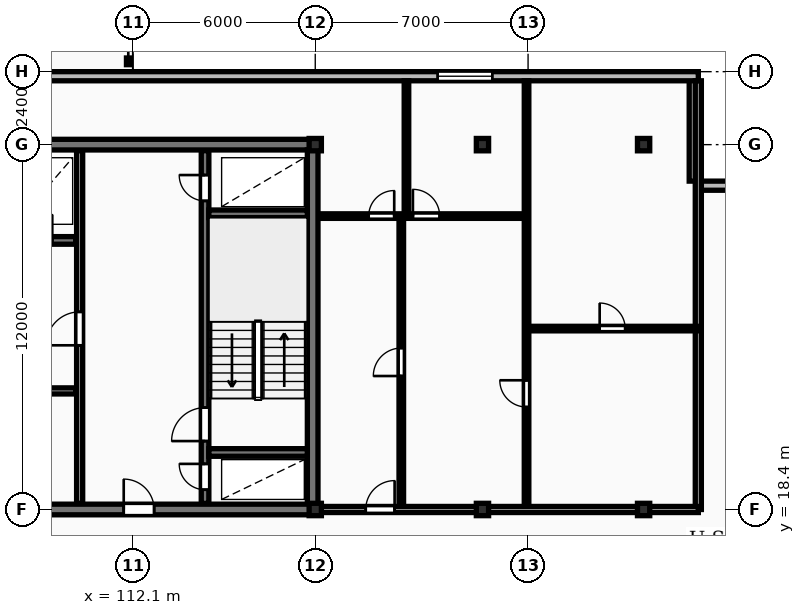
"""IFC4 building model, lengths in metres.
Left out: names, types, materials, properties, quantities, classifications, styles, units other than length and angle.
Written with IfcOpenShell. Run it as: python <this file> out.ifc"""

import sys

from ifc_helpers import new_model, si_unit, direction, frame, frame_2d, origin, origin_2d, place, context, subcontext, project, spatial, rectangle, i_section, extrude, element, fill, save


model = new_model("IFC4")
c1 = context("Model", 3, precision=1e-05, world=origin(), true_north=direction((0.0, 1.0)))
c2 = subcontext(c1, "Body", "Model", "MODEL_VIEW")
j1 = project(units=[si_unit("LENGTHUNIT", "METRE"), si_unit("PLANEANGLEUNIT", "RADIAN")], contexts=[c1])
p1 = place(None, origin())
s1 = spatial("IfcSite", under=j1, at=p1, CompositionType="ELEMENT")
p2 = place(p1, origin())
s2 = spatial("IfcBuilding", under=s1, at=p2, CompositionType="ELEMENT")
p3 = place(p2, frame((0.0, 0.0, 142.9)))
s3 = spatial("IfcBuildingStorey", under=s2, at=p3, CompositionType="ELEMENT", Elevation=142.9)
for number, where, z_axis, x_axis in (
    (1, (118.1, 18.4, 0.0), (0.0, 0.0, 1.0), (1.0, 0.0, 0.0)),
    (2, (118.1, 30.4, 0.0), (0.0, 0.0, 1.0), (1.0, 0.0, 0.0)),
    (3, (123.6, 18.4, 0.0), (0.0, 0.0, 1.0), (1.0, 0.0, 0.0)),
    (4, (123.6, 30.4, 0.0), (0.0, 0.0, 1.0), (1.0, 0.0, 0.0)),
    (5, (128.9, 18.4, 0.0), (0.0, 0.0, 1.0), (1.0, 0.0, 0.0)),
    (6, (128.9, 30.4, 0.0), (0.0, 0.0, 1.0), (1.0, 0.0, 0.0)),
):
    element("IfcColumn", number, at=place(p3, frame(where, z_axis=z_axis, x_axis=x_axis)), inside=s3, PredefinedType="COLUMN", context=c2, shape_type="SweptSolid", body=[
        extrude(i_section(OverallWidth=0.403, OverallDepth=0.406, WebThickness=0.027, FlangeThickness=0.043, FilletRadius=0.015, at=origin_2d()), origin(), (0.0, 0.0, 1.0), 3.6),
    ])
for number, where, z_axis, x_axis in (
    (7, (134.3, 29.05, 0.0), (0.0, 0.0, 1.0), (-1.0, 0.0, 0.0)),
    (8, (130.55, 29.2, 0.0), (0.0, 0.0, 1.0), (0.0, 1.0, 0.0)),
):
    element("IfcWall", number, at=place(p3, frame(where, z_axis=z_axis, x_axis=x_axis)), inside=s3, PredefinedType="STANDARD", context=c2, shape_type="SweptSolid", body=[
        extrude(rectangle(XDim=3.6, YDim=0.3, at=frame_2d((1.8, 0.0))), origin(), (0.0, 0.0, 1.0), 3.31),
    ])
p4 = place(p3, frame((130.7, 32.65, 0.0), z_axis=(0.0, 0.0, 1.0), x_axis=(-1.0, 0.0, 0.0)))
e9 = element("IfcWall", 9, at=p4, inside=s3, PredefinedType="STANDARD", context=c2, shape_type="SweptSolid", body=[
    extrude(rectangle(XDim=58.0, YDim=0.3, at=frame_2d((29.0, 0.0))), origin(), (0.0, 0.0, 1.0), 3.31),
])
p5 = place(p4, frame((50.125, 0.0, 0.85)))
e10 = element("IfcOpeningElement", 10, at=p5, cuts=e9, PredefinedType="OPENING", context=c2, shape_type="SweptSolid", body=[
    extrude(rectangle(XDim=1.8, YDim=1.8, at=frame_2d((0.9, 0.9))), frame((0.0, 0.16, 0.0), z_axis=(0.0, -1.0, 0.0), x_axis=(1.0, 0.0, 0.0)), (0.0, 0.0, 1.0), 0.32),
])
p6 = place(p4, frame((6.775, 0.0, 0.85)))
e11 = element("IfcOpeningElement", 11, at=p6, cuts=e9, PredefinedType="OPENING", context=c2, shape_type="SweptSolid", body=[
    extrude(rectangle(XDim=1.8, YDim=1.8, at=frame_2d((0.9, 0.9))), frame((0.0, 0.16, 0.0), z_axis=(0.0, -1.0, 0.0), x_axis=(1.0, 0.0, 0.0)), (0.0, 0.0, 1.0), 0.32),
])
p7 = place(p4, frame((38.0, 0.0, 0.0)))
e12 = element("IfcOpeningElement", 12, at=p7, cuts=e9, PredefinedType="OPENING", context=c2, shape_type="SweptSolid", body=[
    extrude(rectangle(XDim=1.1, YDim=2.1, at=frame_2d((0.55, 1.05))), frame((0.0, 0.16, 0.0), z_axis=(0.0, -1.0, 0.0), x_axis=(1.0, 0.0, 0.0)), (0.0, 0.0, 1.0), 0.32),
])
p8 = place(p3, frame((81.925, 30.4, 0.0), z_axis=(0.0, 0.0, 1.0), x_axis=(1.0, 0.0, 0.0)))
e13 = element("IfcWall", 13, at=p8, inside=s3, PredefinedType="SHEAR", context=c2, shape_type="SweptSolid", body=[
    extrude(rectangle(XDim=36.265, YDim=0.35, at=frame_2d((18.132, 0.0))), origin(), (0.0, 0.0, 1.0), 3.6),
])
p9 = place(p8, frame((9.675, 0.0, 0.0)))
e14 = element("IfcOpeningElement", 14, at=p9, cuts=e13, PredefinedType="OPENING", context=c2, shape_type="SweptSolid", body=[
    extrude(rectangle(XDim=1.1, YDim=2.1, at=frame_2d((0.55, 1.05))), frame((0.0, 0.185, 0.0), z_axis=(0.0, -1.0, 0.0), x_axis=(1.0, 0.0, 0.0)), (0.0, 0.0, 1.0), 0.37),
])
p10 = place(p3, frame((118.015, 18.575, 0.0), z_axis=(0.0, 0.0, 1.0), x_axis=(0.0, 1.0, 0.0)))
e15 = element("IfcWall", 15, at=p10, inside=s3, PredefinedType="SHEAR", context=c2, shape_type="SweptSolid", body=[
    extrude(rectangle(XDim=11.65, YDim=0.35, at=frame_2d((5.825, 0.0))), origin(), (0.0, 0.0, 1.0), 3.6),
])
p11 = place(p3, frame((81.925, 18.4, 0.0), z_axis=(0.0, 0.0, 1.0), x_axis=(1.0, 0.0, 0.0)))
e16 = element("IfcWall", 16, at=p11, inside=s3, PredefinedType="SHEAR", context=c2, shape_type="SweptSolid", body=[
    extrude(rectangle(XDim=36.265, YDim=0.35, at=frame_2d((18.132, 0.0))), origin(), (0.0, 0.0, 1.0), 3.6),
])
p12 = place(p11, frame((5.675, 0.0, 0.0)))
e17 = element("IfcOpeningElement", 17, at=p12, cuts=e16, PredefinedType="OPENING", context=c2, shape_type="SweptSolid", body=[
    extrude(rectangle(XDim=1.0, YDim=2.15, at=frame_2d((0.5, 1.075))), frame((0.0, 0.185, 0.0), z_axis=(0.0, -1.0, 0.0), x_axis=(1.0, 0.0, 0.0)), (0.0, 0.0, 1.0), 0.37),
])
p13 = place(p11, frame((21.925, 0.0, 0.0)))
e18 = element("IfcOpeningElement", 18, at=p13, cuts=e16, PredefinedType="OPENING", context=c2, shape_type="SweptSolid", body=[
    extrude(rectangle(XDim=1.5, YDim=2.2, at=frame_2d((0.75, 1.1))), frame((0.0, 0.185, 0.0), z_axis=(0.0, -1.0, 0.0), x_axis=(1.0, 0.0, 0.0)), (0.0, 0.0, 1.0), 0.37),
])
p14 = place(p11, frame((29.875, 0.0, 0.0)))
e19 = element("IfcOpeningElement", 19, at=p14, cuts=e16, PredefinedType="OPENING", context=c2, shape_type="SweptSolid", body=[
    extrude(rectangle(XDim=1.0, YDim=2.15, at=frame_2d((0.5, 1.075))), frame((0.0, 0.185, 0.0), z_axis=(0.0, -1.0, 0.0), x_axis=(1.0, 0.0, 0.0)), (0.0, 0.0, 1.0), 0.37),
])
p15 = place(p3, frame((99.68, 27.25, 0.0), z_axis=(0.0, 0.0, 1.0), x_axis=(1.0, 0.0, 0.0)))
e20 = element("IfcWall", 20, at=p15, inside=s3, PredefinedType="SHEAR", context=c2, shape_type="SweptSolid", body=[
    extrude(rectangle(XDim=10.54, YDim=0.25, at=frame_2d((5.27, 0.0))), origin(), (0.0, 0.0, 1.0), 3.6),
])
p16 = place(p15, frame((0.76, 0.0, 0.0)))
e21 = element("IfcOpeningElement", 21, at=p16, cuts=e20, PredefinedType="OPENING", context=c2, shape_type="SweptSolid", body=[
    extrude(rectangle(XDim=1.12, YDim=2.12, at=frame_2d((0.56, 1.06))), frame((0.0, 0.135, 0.0), z_axis=(0.0, -1.0, 0.0), x_axis=(1.0, 0.0, 0.0)), (0.0, 0.0, 1.0), 0.27),
])
p17 = place(p15, frame((3.56, 0.0, 0.0)))
e22 = element("IfcOpeningElement", 22, at=p17, cuts=e20, PredefinedType="OPENING", context=c2, shape_type="SweptSolid", body=[
    extrude(rectangle(XDim=1.12, YDim=2.12, at=frame_2d((0.56, 1.06))), frame((0.0, 0.135, 0.0), z_axis=(0.0, -1.0, 0.0), x_axis=(1.0, 0.0, 0.0)), (0.0, 0.0, 1.0), 0.27),
])
p18 = place(p15, frame((6.36, 0.0, 0.0)))
e23 = element("IfcOpeningElement", 23, at=p18, cuts=e20, PredefinedType="OPENING", context=c2, shape_type="SweptSolid", body=[
    extrude(rectangle(XDim=1.12, YDim=2.12, at=frame_2d((0.56, 1.06))), frame((0.0, 0.135, 0.0), z_axis=(0.0, -1.0, 0.0), x_axis=(1.0, 0.0, 0.0)), (0.0, 0.0, 1.0), 0.27),
])
p19 = place(p15, frame((8.92, 0.0, 0.0)))
e24 = element("IfcOpeningElement", 24, at=p19, cuts=e20, PredefinedType="OPENING", context=c2, shape_type="SweptSolid", body=[
    extrude(rectangle(XDim=0.85, YDim=2.05, at=frame_2d((0.425, 1.025))), frame((0.0, 0.135, 0.0), z_axis=(0.0, -1.0, 0.0), x_axis=(1.0, 0.0, 0.0)), (0.0, 0.0, 1.0), 0.27),
])
p20 = place(p3, frame((91.08, 22.3, 0.0), z_axis=(0.0, 0.0, 1.0), x_axis=(1.0, 0.0, 0.0)))
e25 = element("IfcWall", 25, at=p20, inside=s3, PredefinedType="PARTITIONING", context=c2, shape_type="SweptSolid", body=[
    extrude(rectangle(XDim=19.14, YDim=0.2, at=frame_2d((9.57, 0.0))), origin(), (0.0, 0.0, 1.0), 3.31),
])
p21 = place(p20, frame((1.15, 0.0, 0.0)))
e26 = element("IfcOpeningElement", 26, at=p21, cuts=e25, PredefinedType="OPENING", context=c2, shape_type="SweptSolid", body=[
    extrude(rectangle(XDim=0.85, YDim=2.05, at=frame_2d((0.425, 1.025))), frame((0.0, 0.11, 0.0), z_axis=(0.0, -1.0, 0.0), x_axis=(1.0, 0.0, 0.0)), (0.0, 0.0, 1.0), 0.22),
])
p22 = place(p20, frame((3.2, 0.0, 0.0)))
e27 = element("IfcOpeningElement", 27, at=p22, cuts=e25, PredefinedType="OPENING", context=c2, shape_type="SweptSolid", body=[
    extrude(rectangle(XDim=0.85, YDim=2.05, at=frame_2d((0.425, 1.025))), frame((0.0, 0.11, 0.0), z_axis=(0.0, -1.0, 0.0), x_axis=(1.0, 0.0, 0.0)), (0.0, 0.0, 1.0), 0.22),
])
p23 = place(p20, frame((12.72, 0.0, 0.0)))
e28 = element("IfcOpeningElement", 28, at=p23, cuts=e25, PredefinedType="OPENING", context=c2, shape_type="SweptSolid", body=[
    extrude(rectangle(XDim=1.5, YDim=2.2, at=frame_2d((0.75, 1.1))), frame((0.0, 0.11, 0.0), z_axis=(0.0, -1.0, 0.0), x_axis=(1.0, 0.0, 0.0)), (0.0, 0.0, 1.0), 0.22),
])
p24 = place(p20, frame((6.42, 0.0, 0.0)))
e29 = element("IfcOpeningElement", 29, at=p24, cuts=e25, PredefinedType="OPENING", context=c2, shape_type="SweptSolid", body=[
    extrude(rectangle(XDim=0.92, YDim=2.08, at=frame_2d((0.46, 1.04))), frame((0.0, 0.11, 0.0), z_axis=(0.0, -1.0, 0.0), x_axis=(1.0, 0.0, 0.0)), (0.0, 0.0, 1.0), 0.22),
])
p25 = place(p20, frame((15.87, 0.0, 0.0)))
e30 = element("IfcOpeningElement", 30, at=p25, cuts=e25, PredefinedType="OPENING", context=c2, shape_type="SweptSolid", body=[
    extrude(rectangle(XDim=0.92, YDim=2.08, at=frame_2d((0.46, 1.04))), frame((0.0, 0.11, 0.0), z_axis=(0.0, -1.0, 0.0), x_axis=(1.0, 0.0, 0.0)), (0.0, 0.0, 1.0), 0.22),
])
p26 = place(p3, frame((110.35, 18.6, 0.0), z_axis=(0.0, 0.0, 1.0), x_axis=(0.0, 1.0, 0.0)))
e31 = element("IfcWall", 31, at=p26, inside=s3, PredefinedType="PARTITIONING", context=c2, shape_type="SweptSolid", body=[
    extrude(rectangle(XDim=11.6, YDim=0.2, at=frame_2d((5.8, 0.0))), origin(), (0.0, 0.0, 1.0), 3.31),
])
p27 = place(p26, frame((5.2, 0.0, 0.0)))
e32 = element("IfcOpeningElement", 32, at=p27, cuts=e31, PredefinedType="OPENING", context=c2, shape_type="SweptSolid", body=[
    extrude(rectangle(XDim=1.1, YDim=2.15, at=frame_2d((0.55, 1.075))), frame((0.0, 0.11, 0.0), z_axis=(0.0, -1.0, 0.0), x_axis=(1.0, 0.0, 0.0)), (0.0, 0.0, 1.0), 0.22),
])
p28 = place(p3, frame((114.475, 18.6, 0.0), z_axis=(0.0, 0.0, 1.0), x_axis=(0.0, 1.0, 0.0)))
e33 = element("IfcWall", 33, at=p28, inside=s3, PredefinedType="SHEAR", context=c2, shape_type="SweptSolid", body=[
    extrude(rectangle(XDim=11.6, YDim=0.25, at=frame_2d((5.8, 0.0))), origin(), (0.0, 0.0, 1.0), 3.6),
])
p29 = place(p28, frame((0.45, 0.0, 0.0)))
e34 = element("IfcOpeningElement", 34, at=p29, cuts=e33, PredefinedType="OPENING", context=c2, shape_type="SweptSolid", body=[
    extrude(rectangle(XDim=0.85, YDim=2.05, at=frame_2d((0.425, 1.025))), frame((0.0, 0.135, 0.0), z_axis=(0.0, -1.0, 0.0), x_axis=(1.0, 0.0, 0.0)), (0.0, 0.0, 1.0), 0.27),
])
p30 = place(p28, frame((2.05, 0.0, 0.0)))
e35 = element("IfcOpeningElement", 35, at=p30, cuts=e33, PredefinedType="OPENING", context=c2, shape_type="SweptSolid", body=[
    extrude(rectangle(XDim=1.1, YDim=2.1, at=frame_2d((0.55, 1.05))), frame((0.0, 0.135, 0.0), z_axis=(0.0, -1.0, 0.0), x_axis=(1.0, 0.0, 0.0)), (0.0, 0.0, 1.0), 0.27),
])
p31 = place(p28, frame((9.95, 0.0, 0.0)))
e36 = element("IfcOpeningElement", 36, at=p31, cuts=e33, PredefinedType="OPENING", context=c2, shape_type="SweptSolid", body=[
    extrude(rectangle(XDim=0.85, YDim=2.05, at=frame_2d((0.425, 1.025))), frame((0.0, 0.135, 0.0), z_axis=(0.0, -1.0, 0.0), x_axis=(1.0, 0.0, 0.0)), (0.0, 0.0, 1.0), 0.27),
])
for number, where, z_axis, x_axis in (
    (37, (114.6, 20.275, 0.0), (0.0, 0.0, 1.0), (1.0, 0.0, 0.0)),
    (38, (114.6, 28.125, 0.0), (0.0, 0.0, 1.0), (1.0, 0.0, 0.0)),
):
    element("IfcWall", number, at=place(p3, frame(where, z_axis=z_axis, x_axis=x_axis)), inside=s3, PredefinedType="SHEAR", context=c2, shape_type="SweptSolid", body=[
        extrude(rectangle(XDim=3.24, YDim=0.25, at=frame_2d((1.62, 0.0))), origin(), (0.0, 0.0, 1.0), 3.6),
    ])
p32 = place(p3, frame((130.7, 18.4, 0.0), z_axis=(0.0, 0.0, 1.0), x_axis=(0.0, 1.0, 0.0)))
e39 = element("IfcWall", 39, at=p32, inside=s3, PredefinedType="PARTITIONING", context=c2, shape_type="SweptSolid", body=[
    extrude(rectangle(XDim=14.1, YDim=0.2, at=frame_2d((7.05, 0.0))), origin(), (0.0, 0.0, 1.0), 3.31),
])
p33 = place(p3, frame((125.05, 24.35, 0.0), z_axis=(0.0, 0.0, 1.0), x_axis=(1.0, 0.0, 0.0)))
e40 = element("IfcWall", 40, at=p33, inside=s3, PredefinedType="PARTITIONING", context=c2, shape_type="SweptSolid", body=[
    extrude(rectangle(XDim=5.65, YDim=0.15, at=frame_2d((2.825, 0.0))), origin(), (0.0, 0.0, 1.0), 3.31),
])
p34 = place(p33, frame((2.405, 0.0, 0.0)))
e41 = element("IfcOpeningElement", 41, at=p34, cuts=e40, PredefinedType="OPENING", context=c2, shape_type="SweptSolid", body=[
    extrude(rectangle(XDim=0.84, YDim=2.04, at=frame_2d((0.42, 1.02))), frame((0.0, 0.085, 0.0), z_axis=(0.0, -1.0, 0.0), x_axis=(1.0, 0.0, 0.0)), (0.0, 0.0, 1.0), 0.17),
])
p35 = place(p3, frame((125.05, 18.45, 0.0), z_axis=(0.0, 0.0, 1.0), x_axis=(0.0, 1.0, 0.0)))
e42 = element("IfcWall", 42, at=p35, inside=s3, PredefinedType="PARTITIONING", context=c2, shape_type="SweptSolid", body=[
    extrude(rectangle(XDim=14.05, YDim=0.15, at=frame_2d((7.025, 0.0))), origin(), (0.0, 0.0, 1.0), 3.31),
])
p36 = place(p35, frame((3.32, 0.0, 0.0)))
e43 = element("IfcOpeningElement", 43, at=p36, cuts=e42, PredefinedType="OPENING", context=c2, shape_type="SweptSolid", body=[
    extrude(rectangle(XDim=0.88, YDim=2.06, at=frame_2d((0.44, 1.03))), frame((0.0, 0.085, 0.0), z_axis=(0.0, -1.0, 0.0), x_axis=(1.0, 0.0, 0.0)), (0.0, 0.0, 1.0), 0.17),
])
p37 = place(p3, frame((120.93, 18.45, 0.0), z_axis=(0.0, 0.0, 1.0), x_axis=(0.0, 1.0, 0.0)))
e44 = element("IfcWall", 44, at=p37, inside=s3, PredefinedType="PARTITIONING", context=c2, shape_type="SweptSolid", body=[
    extrude(rectangle(XDim=9.6, YDim=0.15, at=frame_2d((4.8, 0.0))), origin(), (0.0, 0.0, 1.0), 3.31),
])
p38 = place(p37, frame((4.34, 0.0, 0.0)))
e45 = element("IfcOpeningElement", 45, at=p38, cuts=e44, PredefinedType="OPENING", context=c2, shape_type="SweptSolid", body=[
    extrude(rectangle(XDim=0.92, YDim=2.08, at=frame_2d((0.46, 1.04))), frame((0.0, 0.085, 0.0), z_axis=(0.0, -1.0, 0.0), x_axis=(1.0, 0.0, 0.0)), (0.0, 0.0, 1.0), 0.17),
])
p39 = place(p3, frame((121.1, 28.05, 0.0), z_axis=(0.0, 0.0, 1.0), x_axis=(0.0, 1.0, 0.0)))
e46 = element("IfcWall", 46, at=p39, inside=s3, PredefinedType="PARTITIONING", context=c2, shape_type="SweptSolid", body=[
    extrude(rectangle(XDim=4.45, YDim=0.15, at=frame_2d((2.225, 0.0))), origin(), (0.0, 0.0, 1.0), 3.31),
])
p40 = place(p3, frame((118.27, 28.05, 0.0), z_axis=(0.0, 0.0, 1.0), x_axis=(1.0, 0.0, 0.0)))
e47 = element("IfcWall", 47, at=p40, inside=s3, PredefinedType="PARTITIONING", context=c2, shape_type="SweptSolid", body=[
    extrude(rectangle(XDim=6.76, YDim=0.15, at=frame_2d((3.38, 0.0))), origin(), (0.0, 0.0, 1.0), 3.31),
])
p41 = place(p40, frame((1.587, 0.0, 0.0)))
e48 = element("IfcOpeningElement", 48, at=p41, cuts=e47, PredefinedType="OPENING", context=c2, shape_type="SweptSolid", body=[
    extrude(rectangle(XDim=0.84, YDim=2.04, at=frame_2d((0.42, 1.02))), frame((0.0, 0.085, 0.0), z_axis=(0.0, -1.0, 0.0), x_axis=(1.0, 0.0, 0.0)), (0.0, 0.0, 1.0), 0.17),
])
p42 = place(p40, frame((3.042, 0.0, 0.0)))
e49 = element("IfcOpeningElement", 49, at=p42, cuts=e47, PredefinedType="OPENING", context=c2, shape_type="SweptSolid", body=[
    extrude(rectangle(XDim=0.88, YDim=2.06, at=frame_2d((0.44, 1.03))), frame((0.0, 0.085, 0.0), z_axis=(0.0, -1.0, 0.0), x_axis=(1.0, 0.0, 0.0)), (0.0, 0.0, 1.0), 0.17),
])
p43 = place(p3, frame((118.25, 18.4, 0.0), z_axis=(0.0, 0.0, 1.0), x_axis=(1.0, 0.0, 0.0)))
e50 = element("IfcWall", 50, at=p43, inside=s3, PredefinedType="PARTITIONING", context=c2, shape_type="SweptSolid", body=[
    extrude(rectangle(XDim=12.45, YDim=0.2, at=frame_2d((6.225, 0.0))), origin(), (0.0, 0.0, 1.0), 2.698),
])
p44 = place(p43, frame((1.51, 0.0, 0.0)))
e51 = element("IfcOpeningElement", 51, at=p44, cuts=e50, PredefinedType="OPENING", context=c2, shape_type="SweptSolid", body=[
    extrude(rectangle(XDim=0.95, YDim=2.15, at=frame_2d((0.475, 1.075))), frame((0.0, 0.11, 0.0), z_axis=(0.0, -1.0, 0.0), x_axis=(1.0, 0.0, 0.0)), (0.0, 0.0, 1.0), 0.22),
])
p45 = place(p6, origin())
e52 = element("IfcWindow", 52, at=p45, inside=s3, PartitioningType="SINGLE_PANEL", PredefinedType="WINDOW", context=c2, shape_type="SweptSolid", body=[
    extrude(rectangle(XDim=1.8, YDim=1.8, at=frame_2d((0.9, 0.9))), frame((0.0, 0.03, 0.0), z_axis=(0.0, -1.0, 0.0), x_axis=(1.0, 0.0, 0.0)), (0.0, 0.0, 1.0), 0.06),
])
fill(e11, e52)
p46 = place(p14, origin())
e53 = element("IfcDoor", 53, at=p46, inside=s3, OperationType="SINGLE_SWING_LEFT", PredefinedType="DOOR", context=c2, shape_type="SweptSolid", body=[
    extrude(rectangle(XDim=1.0, YDim=2.15, at=frame_2d((0.5, 1.075))), frame((0.0, 0.025, 0.0), z_axis=(0.0, -1.0, 0.0), x_axis=(1.0, 0.0, 0.0)), (0.0, 0.0, 1.0), 0.05),
])
fill(e19, e53)
p47 = place(p27, origin())
e54 = element("IfcDoor", 54, at=p47, inside=s3, OperationType="SINGLE_SWING_LEFT", PredefinedType="DOOR", context=c2, shape_type="SweptSolid", body=[
    extrude(rectangle(XDim=1.1, YDim=2.15, at=frame_2d((0.55, 1.075))), frame((0.0, 0.025, 0.0), z_axis=(0.0, -1.0, 0.0), x_axis=(1.0, 0.0, 0.0)), (0.0, 0.0, 1.0), 0.05),
])
fill(e32, e54)
p48 = place(p29, origin())
e55 = element("IfcDoor", 55, at=p48, inside=s3, OperationType="SINGLE_SWING_RIGHT", PredefinedType="DOOR", context=c2, shape_type="SweptSolid", body=[
    extrude(rectangle(XDim=0.85, YDim=2.05, at=frame_2d((0.425, 1.025))), frame((0.0, 0.025, 0.0), z_axis=(0.0, -1.0, 0.0), x_axis=(1.0, 0.0, 0.0)), (0.0, 0.0, 1.0), 0.05),
])
fill(e34, e55)
p49 = place(p30, origin())
e56 = element("IfcDoor", 56, at=p49, inside=s3, OperationType="SINGLE_SWING_LEFT", PredefinedType="DOOR", context=c2, shape_type="SweptSolid", body=[
    extrude(rectangle(XDim=1.1, YDim=2.1, at=frame_2d((0.55, 1.05))), frame((0.0, 0.025, 0.0), z_axis=(0.0, -1.0, 0.0), x_axis=(1.0, 0.0, 0.0)), (0.0, 0.0, 1.0), 0.05),
])
fill(e35, e56)
p50 = place(p31, origin())
e57 = element("IfcDoor", 57, at=p50, inside=s3, OperationType="SINGLE_SWING_RIGHT", PredefinedType="DOOR", context=c2, shape_type="SweptSolid", body=[
    extrude(rectangle(XDim=0.85, YDim=2.05, at=frame_2d((0.425, 1.025))), frame((0.0, 0.025, 0.0), z_axis=(0.0, -1.0, 0.0), x_axis=(1.0, 0.0, 0.0)), (0.0, 0.0, 1.0), 0.05),
])
fill(e36, e57)
p51 = place(p34, origin())
e58 = element("IfcDoor", 58, at=p51, inside=s3, OperationType="SINGLE_SWING_LEFT", PredefinedType="DOOR", context=c2, shape_type="SweptSolid", body=[
    extrude(rectangle(XDim=0.84, YDim=2.04, at=frame_2d((0.42, 1.02))), frame((0.0, 0.025, 0.0), z_axis=(0.0, -1.0, 0.0), x_axis=(1.0, 0.0, 0.0)), (0.0, 0.0, 1.0), 0.05),
])
fill(e41, e58)
p52 = place(p36, origin())
e59 = element("IfcDoor", 59, at=p52, inside=s3, OperationType="SINGLE_SWING_RIGHT", PredefinedType="DOOR", context=c2, shape_type="SweptSolid", body=[
    extrude(rectangle(XDim=0.88, YDim=2.06, at=frame_2d((0.44, 1.03))), frame((0.0, 0.025, 0.0), z_axis=(0.0, -1.0, 0.0), x_axis=(1.0, 0.0, 0.0)), (0.0, 0.0, 1.0), 0.05),
])
fill(e43, e59)
p53 = place(p38, origin())
e60 = element("IfcDoor", 60, at=p53, inside=s3, OperationType="SINGLE_SWING_LEFT", PredefinedType="DOOR", context=c2, shape_type="SweptSolid", body=[
    extrude(rectangle(XDim=0.92, YDim=2.08, at=frame_2d((0.46, 1.04))), frame((0.0, 0.025, 0.0), z_axis=(0.0, -1.0, 0.0), x_axis=(1.0, 0.0, 0.0)), (0.0, 0.0, 1.0), 0.05),
])
fill(e45, e60)
p54 = place(p41, origin())
e61 = element("IfcDoor", 61, at=p54, inside=s3, OperationType="SINGLE_SWING_RIGHT", PredefinedType="DOOR", context=c2, shape_type="SweptSolid", body=[
    extrude(rectangle(XDim=0.84, YDim=2.04, at=frame_2d((0.42, 1.02))), frame((0.0, 0.025, 0.0), z_axis=(0.0, -1.0, 0.0), x_axis=(1.0, 0.0, 0.0)), (0.0, 0.0, 1.0), 0.05),
])
fill(e48, e61)
p55 = place(p42, origin())
e62 = element("IfcDoor", 62, at=p55, inside=s3, OperationType="SINGLE_SWING_LEFT", PredefinedType="DOOR", context=c2, shape_type="SweptSolid", body=[
    extrude(rectangle(XDim=0.88, YDim=2.06, at=frame_2d((0.44, 1.03))), frame((0.0, 0.025, 0.0), z_axis=(0.0, -1.0, 0.0), x_axis=(1.0, 0.0, 0.0)), (0.0, 0.0, 1.0), 0.05),
])
fill(e49, e62)
p56 = place(p44, origin())
e63 = element("IfcDoor", 63, at=p56, inside=s3, OperationType="SINGLE_SWING_RIGHT", PredefinedType="DOOR", context=c2, shape_type="SweptSolid", body=[
    extrude(rectangle(XDim=0.95, YDim=2.15, at=frame_2d((0.475, 1.075))), frame((0.0, 0.025, 0.0), z_axis=(0.0, -1.0, 0.0), x_axis=(1.0, 0.0, 0.0)), (0.0, 0.0, 1.0), 0.05),
])
fill(e51, e63)
save(model, sys.argv[1])
